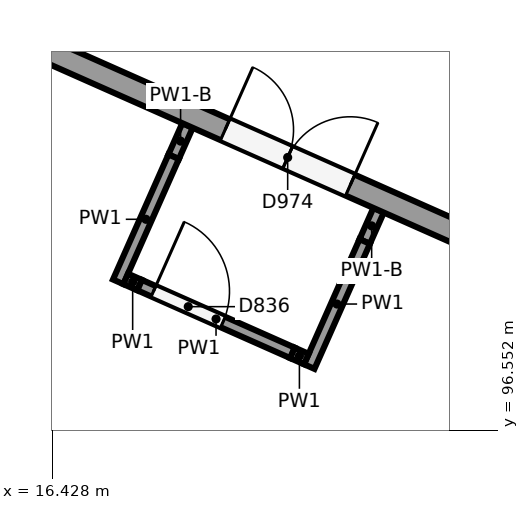
"""IFC4 building model, lengths in metres.
Left out: names, types, materials, properties, quantities, classifications, styles, units other than length and angle.
Written with IfcOpenShell. Run it as: python <this file> out.ifc"""

import sys

from ifc_helpers import new_model, si_unit, direction, frame, frame_2d, origin, place, context, subcontext, project, spatial, rectangle, extrude, element, fill, save


model = new_model("IFC4")
c1 = context("Model", 3, precision=1e-05, world=origin(), true_north=direction((0.0, 1.0)))
c2 = subcontext(c1, "Body", "Model", "MODEL_VIEW")
j1 = project(units=[si_unit("LENGTHUNIT", "METRE"), si_unit("PLANEANGLEUNIT", "RADIAN")], contexts=[c1])
p1 = place(None, origin())
s1 = spatial("IfcSite", under=j1, at=p1, CompositionType="ELEMENT")
p2 = place(p1, origin())
s2 = spatial("IfcBuilding", under=s1, at=p2, CompositionType="ELEMENT")
p3 = place(p2, origin())
s3 = spatial("IfcBuildingStorey", under=s2, at=p3, CompositionType="ELEMENT", Elevation=0.0)
p4 = place(p3, frame((8.123, 105.198, 0.0), z_axis=(0.0, 0.0, 1.0), x_axis=(0.914138897099, -0.405401130748, 0.0)))
e1 = element("IfcWall", 1, at=p4, inside=s3, PredefinedType="SOLIDWALL", context=c2, shape_type="SweptSolid", body=[
    extrude(rectangle(XDim=15.824, YDim=0.3, at=frame_2d((7.912, 0.0))), origin(), (0.0, 0.0, 1.0), 4.85),
])
p5 = place(p4, frame((11.574, 0.0, 0.0)))
e2 = element("IfcOpeningElement", 2, at=p5, cuts=e1, PredefinedType="OPENING", context=c2, shape_type="SweptSolid", body=[
    extrude(rectangle(XDim=1.8, YDim=2.4, at=frame_2d((0.9, 1.2))), frame((0.0, 0.16, 0.0), z_axis=(0.0, -1.0, 0.0), x_axis=(1.0, 0.0, 0.0)), (0.0, 0.0, 1.0), 0.32),
])
p6 = place(p3, frame((18.208, 100.561, 0.0), z_axis=(0.0, 0.0, 1.0), x_axis=(-0.405282518143, -0.914191490054, 0.0)))
e3 = element("IfcWall", 3, at=p6, inside=s3, PredefinedType="PARTITIONING", context=c2, shape_type="SweptSolid", body=[
    extrude(rectangle(XDim=0.45, YDim=0.15, at=frame_2d((0.225, 0.0))), origin(), (0.0, 0.0, 1.0), 4.85),
])
p7 = place(p3, frame((18.026, 100.149, 0.0), z_axis=(0.0, 0.0, 1.0), x_axis=(-0.405395866652, -0.914141231595, 0.0)))
e4 = element("IfcWall", 4, at=p7, inside=s3, PredefinedType="PARTITIONING", context=c2, shape_type="SweptSolid", body=[
    extrude(rectangle(XDim=1.8, YDim=0.15, at=frame_2d((0.9, 0.0))), origin(), (0.0, 0.0, 1.0), 6.15),
])
p8 = place(p3, frame((20.722, 99.446, 0.0), z_axis=(0.0, 0.0, 1.0), x_axis=(-0.405282518143, -0.914191490054, 0.0)))
e5 = element("IfcWall", 5, at=p8, inside=s3, PredefinedType="PARTITIONING", context=c2, shape_type="SweptSolid", body=[
    extrude(rectangle(XDim=0.45, YDim=0.15, at=frame_2d((0.225, 0.0))), origin(), (0.0, 0.0, 1.0), 4.85),
])
p9 = place(p3, frame((20.54, 99.035, 0.0), z_axis=(0.0, 0.0, 1.0), x_axis=(-0.405395866652, -0.914141231595, 0.0)))
e6 = element("IfcWall", 6, at=p9, inside=s3, PredefinedType="PARTITIONING", context=c2, shape_type="SweptSolid", body=[
    extrude(rectangle(XDim=1.8, YDim=0.15, at=frame_2d((0.9, 0.0))), origin(), (0.0, 0.0, 1.0), 6.15),
])
p10 = place(p3, frame((17.395, 98.542, 0.0), z_axis=(0.0, 0.0, 1.0), x_axis=(0.914213764774, -0.405232269566, 0.0)))
e7 = element("IfcWall", 7, at=p10, inside=s3, PredefinedType="PARTITIONING", context=c2, shape_type="SweptSolid", body=[
    extrude(rectangle(XDim=0.2, YDim=0.15, at=frame_2d((0.1, 0.0))), origin(), (0.0, 0.0, 1.0), 6.15),
])
p11 = place(p3, frame((17.578, 98.461, 0.0), z_axis=(0.0, 0.0, 1.0), x_axis=(0.914113298408, -0.405458848311, 0.0)))
e8 = element("IfcWall", 8, at=p11, inside=s3, PredefinedType="PARTITIONING", context=c2, shape_type="SweptSolid", body=[
    extrude(rectangle(XDim=2.2, YDim=0.15, at=frame_2d((1.1, 0.0))), origin(), (0.0, 0.0, 1.0), 6.15),
])
p12 = place(p11, frame((0.2, 0.0, 0.0)))
e9 = element("IfcOpeningElement", 9, at=p12, cuts=e8, PredefinedType="OPENING", context=c2, shape_type="SweptSolid", body=[
    extrude(rectangle(XDim=1.0, YDim=2.1, at=frame_2d((0.5, 1.05))), frame((0.0, 0.085, 0.0), z_axis=(0.0, -1.0, 0.0), x_axis=(1.0, 0.0, 0.0)), (0.0, 0.0, 1.0), 0.17),
])
p13 = place(p3, frame((19.589, 97.569, 0.0), z_axis=(0.0, 0.0, 1.0), x_axis=(0.914213764774, -0.405232269566, 0.0)))
e10 = element("IfcWall", 10, at=p13, inside=s3, PredefinedType="PARTITIONING", context=c2, shape_type="SweptSolid", body=[
    extrude(rectangle(XDim=0.2, YDim=0.15, at=frame_2d((0.1, 0.0))), origin(), (0.0, 0.0, 1.0), 6.15),
])
p14 = place(p5, origin())
e11 = element("IfcDoor", 11, at=p14, inside=s3, OperationType="DOUBLE_DOOR_SINGLE_SWING", PredefinedType="DOOR", context=c2, shape_type="SweptSolid", body=[
    extrude(rectangle(XDim=1.8, YDim=2.4, at=frame_2d((0.9, 1.2))), frame((0.0, 0.025, 0.0), z_axis=(0.0, -1.0, 0.0), x_axis=(1.0, 0.0, 0.0)), (0.0, 0.0, 1.0), 0.05),
])
fill(e2, e11)
p15 = place(p12, origin())
e12 = element("IfcDoor", 12, at=p15, inside=s3, OperationType="SINGLE_SWING_LEFT", PredefinedType="DOOR", context=c2, shape_type="SweptSolid", body=[
    extrude(rectangle(XDim=1.0, YDim=2.1, at=frame_2d((0.5, 1.05))), frame((0.0, 0.025, 0.0), z_axis=(0.0, -1.0, 0.0), x_axis=(1.0, 0.0, 0.0)), (0.0, 0.0, 1.0), 0.05),
])
fill(e9, e12)
save(model, sys.argv[1])
